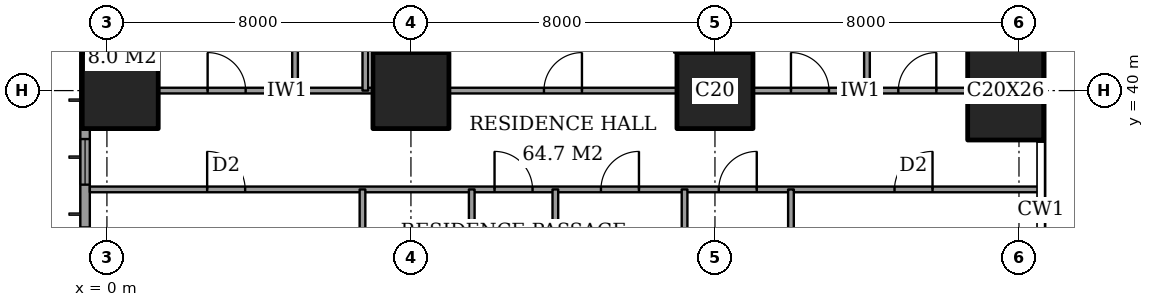
"""IFC4 building model, lengths in metres.
Left out: names, types, materials, properties, quantities, classifications, styles, units other than length and angle.
Written with IfcOpenShell. Run it as: python <this file> out.ifc"""

import sys

from ifc_helpers import new_model, si_unit, direction, frame, frame_2d, origin, origin_2d, place, context, subcontext, project, spatial, rectangle, extrude, element, fill, save


model = new_model("IFC4")
c1 = context("Model", 3, precision=1e-05, world=origin(), true_north=direction((0.0, 1.0)))
c2 = subcontext(c1, "Body", "Model", "MODEL_VIEW")
j1 = project(units=[si_unit("LENGTHUNIT", "METRE"), si_unit("PLANEANGLEUNIT", "RADIAN")], contexts=[c1])
p1 = place(None, origin())
s1 = spatial("IfcSite", under=j1, at=p1, CompositionType="ELEMENT")
p2 = place(p1, origin())
s2 = spatial("IfcBuilding", under=s1, at=p2, CompositionType="ELEMENT")
p3 = place(p2, frame((0.0, 0.0, 72.8)))
s3 = spatial("IfcBuildingStorey", under=s2, at=p3, CompositionType="ELEMENT", Elevation=72.8)
for number, where, z_axis, x_axis in (
    (1, (0.35, 40.0, 0.0), (0.0, 0.0, 1.0), (1.0, 0.0, 0.0)),
    (2, (8.0, 40.0, 0.0), (0.0, 0.0, 1.0), (1.0, 0.0, 0.0)),
    (3, (16.0, 40.0, 0.0), (0.0, 0.0, 1.0), (1.0, 0.0, 0.0)),
):
    element("IfcColumn", number, at=place(p3, frame(where, z_axis=z_axis, x_axis=x_axis)), inside=s3, PredefinedType="COLUMN", context=c2, shape_type="SweptSolid", body=[
        extrude(rectangle(XDim=2.0, YDim=2.0, at=origin_2d()), origin(), (0.0, 0.0, 1.0), 3.6),
    ])
p4 = place(p3, frame((23.65, 40.0, 0.0), z_axis=(0.0, 0.0, 1.0), x_axis=(1.0, 0.0, 0.0)))
e4 = element("IfcColumn", 4, at=p4, inside=s3, PredefinedType="COLUMN", context=c2, shape_type="SweptSolid", body=[
    extrude(rectangle(XDim=2.0, YDim=2.6, at=origin_2d()), origin(), (0.0, 0.0, 1.0), 3.6),
])
p5 = place(p3, frame((-0.575, 44.825, 0.0), z_axis=(0.0, 0.0, 1.0), x_axis=(0.0, -1.0, 0.0)))
e5 = element("IfcWall", 5, at=p5, inside=s3, PredefinedType="SOLIDWALL", context=c2, shape_type="SweptSolid", body=[
    extrude(rectangle(XDim=41.65, YDim=0.25, at=frame_2d((20.825, 0.0))), origin(), (0.0, 0.0, 1.0), 3.6),
])
p6 = place(p5, frame((0.775, 0.0, 0.6)))
e6 = element("IfcOpeningElement", 6, at=p6, cuts=e5, PredefinedType="OPENING", context=c2, shape_type="SweptSolid", body=[
    extrude(rectangle(XDim=2.4, YDim=2.0, at=frame_2d((1.2, 1.0))), frame((0.0, 0.135, 0.0), z_axis=(0.0, -1.0, 0.0), x_axis=(1.0, 0.0, 0.0)), (0.0, 0.0, 1.0), 0.27),
])
p7 = place(p5, frame((6.1, 0.0, 0.6)))
e7 = element("IfcOpeningElement", 7, at=p7, cuts=e5, PredefinedType="OPENING", context=c2, shape_type="SweptSolid", body=[
    extrude(rectangle(XDim=1.2, YDim=2.0, at=frame_2d((0.6, 1.0))), frame((0.0, 0.135, 0.0), z_axis=(0.0, -1.0, 0.0), x_axis=(1.0, 0.0, 0.0)), (0.0, 0.0, 1.0), 0.27),
])
p8 = place(p5, frame((8.425, 0.0, 0.6)))
e8 = element("IfcOpeningElement", 8, at=p8, cuts=e5, PredefinedType="OPENING", context=c2, shape_type="SweptSolid", body=[
    extrude(rectangle(XDim=2.4, YDim=2.0, at=frame_2d((1.2, 1.0))), frame((0.0, 0.135, 0.0), z_axis=(0.0, -1.0, 0.0), x_axis=(1.0, 0.0, 0.0)), (0.0, 0.0, 1.0), 0.27),
])
p9 = place(p5, frame((15.625, 0.0, 0.6)))
e9 = element("IfcOpeningElement", 9, at=p9, cuts=e5, PredefinedType="OPENING", context=c2, shape_type="SweptSolid", body=[
    extrude(rectangle(XDim=2.4, YDim=2.0, at=frame_2d((1.2, 1.0))), frame((0.0, 0.135, 0.0), z_axis=(0.0, -1.0, 0.0), x_axis=(1.0, 0.0, 0.0)), (0.0, 0.0, 1.0), 0.27),
])
p10 = place(p5, frame((23.625, 0.0, 0.6)))
e10 = element("IfcOpeningElement", 10, at=p10, cuts=e5, PredefinedType="OPENING", context=c2, shape_type="SweptSolid", body=[
    extrude(rectangle(XDim=2.4, YDim=2.0, at=frame_2d((1.2, 1.0))), frame((0.0, 0.135, 0.0), z_axis=(0.0, -1.0, 0.0), x_axis=(1.0, 0.0, 0.0)), (0.0, 0.0, 1.0), 0.27),
])
p11 = place(p5, frame((30.625, 0.0, 0.6)))
e11 = element("IfcOpeningElement", 11, at=p11, cuts=e5, PredefinedType="OPENING", context=c2, shape_type="SweptSolid", body=[
    extrude(rectangle(XDim=2.4, YDim=2.0, at=frame_2d((1.2, 1.0))), frame((0.0, 0.135, 0.0), z_axis=(0.0, -1.0, 0.0), x_axis=(1.0, 0.0, 0.0)), (0.0, 0.0, 1.0), 0.27),
])
p12 = place(p5, frame((34.225, 0.0, 0.6)))
e12 = element("IfcOpeningElement", 12, at=p12, cuts=e5, PredefinedType="OPENING", context=c2, shape_type="SweptSolid", body=[
    extrude(rectangle(XDim=1.2, YDim=2.0, at=frame_2d((0.6, 1.0))), frame((0.0, 0.135, 0.0), z_axis=(0.0, -1.0, 0.0), x_axis=(1.0, 0.0, 0.0)), (0.0, 0.0, 1.0), 0.27),
])
p13 = place(p5, frame((38.475, 0.0, 0.6)))
e13 = element("IfcOpeningElement", 13, at=p13, cuts=e5, PredefinedType="OPENING", context=c2, shape_type="SweptSolid", body=[
    extrude(rectangle(XDim=2.4, YDim=2.0, at=frame_2d((1.2, 1.0))), frame((0.0, 0.135, 0.0), z_axis=(0.0, -1.0, 0.0), x_axis=(1.0, 0.0, 0.0)), (0.0, 0.0, 1.0), 0.27),
])
p14 = place(p3, frame((-0.45, 37.4, 0.0), z_axis=(0.0, 0.0, 1.0), x_axis=(1.0, 0.0, 0.0)))
e14 = element("IfcWall", 14, at=p14, inside=s3, PredefinedType="PARTITIONING", context=c2, shape_type="SweptSolid", body=[
    extrude(rectangle(XDim=25.011, YDim=0.15, at=frame_2d((12.505, 0.0))), origin(), (0.0, 0.0, 1.0), 3.35),
])
p15 = place(p14, frame((10.65, 0.0, 0.0)))
e15 = element("IfcOpeningElement", 15, at=p15, cuts=e14, PredefinedType="OPENING", context=c2, shape_type="SweptSolid", body=[
    extrude(rectangle(XDim=1.0, YDim=2.1, at=frame_2d((0.5, 1.05))), frame((0.0, 0.085, 0.0), z_axis=(0.0, -1.0, 0.0), x_axis=(1.0, 0.0, 0.0)), (0.0, 0.0, 1.0), 0.17),
])
p16 = place(p14, frame((3.087, 0.0, 0.0)))
e16 = element("IfcOpeningElement", 16, at=p16, cuts=e14, PredefinedType="OPENING", context=c2, shape_type="SweptSolid", body=[
    extrude(rectangle(XDim=1.0, YDim=2.1, at=frame_2d((0.5, 1.05))), frame((0.0, 0.085, 0.0), z_axis=(0.0, -1.0, 0.0), x_axis=(1.0, 0.0, 0.0)), (0.0, 0.0, 1.0), 0.17),
])
p17 = place(p14, frame((13.45, 0.0, 0.0)))
e17 = element("IfcOpeningElement", 17, at=p17, cuts=e14, PredefinedType="OPENING", context=c2, shape_type="SweptSolid", body=[
    extrude(rectangle(XDim=1.0, YDim=2.1, at=frame_2d((0.5, 1.05))), frame((0.0, 0.085, 0.0), z_axis=(0.0, -1.0, 0.0), x_axis=(1.0, 0.0, 0.0)), (0.0, 0.0, 1.0), 0.17),
])
p18 = place(p14, frame((16.55, 0.0, 0.0)))
e18 = element("IfcOpeningElement", 18, at=p18, cuts=e14, PredefinedType="OPENING", context=c2, shape_type="SweptSolid", body=[
    extrude(rectangle(XDim=1.0, YDim=2.1, at=frame_2d((0.5, 1.05))), frame((0.0, 0.085, 0.0), z_axis=(0.0, -1.0, 0.0), x_axis=(1.0, 0.0, 0.0)), (0.0, 0.0, 1.0), 0.17),
])
p19 = place(p14, frame((21.175, 0.0, 0.0)))
e19 = element("IfcOpeningElement", 19, at=p19, cuts=e14, PredefinedType="OPENING", context=c2, shape_type="SweptSolid", body=[
    extrude(rectangle(XDim=1.0, YDim=2.1, at=frame_2d((0.5, 1.05))), frame((0.0, 0.085, 0.0), z_axis=(0.0, -1.0, 0.0), x_axis=(1.0, 0.0, 0.0)), (0.0, 0.0, 1.0), 0.17),
])
p20 = place(p3, frame((1.35, 40.0, 0.0), z_axis=(0.0, 0.0, 1.0), x_axis=(1.0, 0.0, 0.0)))
e20 = element("IfcWall", 20, at=p20, inside=s3, PredefinedType="PARTITIONING", context=c2, shape_type="SweptSolid", body=[
    extrude(rectangle(XDim=5.65, YDim=0.15, at=frame_2d((2.825, 0.0))), origin(), (0.0, 0.0, 1.0), 3.35),
])
p21 = place(p20, frame((1.3, 0.0, 0.0)))
e21 = element("IfcOpeningElement", 21, at=p21, cuts=e20, PredefinedType="OPENING", context=c2, shape_type="SweptSolid", body=[
    extrude(rectangle(XDim=1.0, YDim=2.1, at=frame_2d((0.5, 1.05))), frame((0.0, 0.085, 0.0), z_axis=(0.0, -1.0, 0.0), x_axis=(1.0, 0.0, 0.0)), (0.0, 0.0, 1.0), 0.17),
])
p22 = place(p3, frame((9.0, 40.0, 0.0), z_axis=(0.0, 0.0, 1.0), x_axis=(1.0, 0.0, 0.0)))
e22 = element("IfcWall", 22, at=p22, inside=s3, PredefinedType="PARTITIONING", context=c2, shape_type="SweptSolid", body=[
    extrude(rectangle(XDim=6.0, YDim=0.15, at=frame_2d((3.0, 0.0))), origin(), (0.0, 0.0, 1.0), 3.35),
])
p23 = place(p22, frame((2.5, 0.0, 0.0)))
e23 = element("IfcOpeningElement", 23, at=p23, cuts=e22, PredefinedType="OPENING", context=c2, shape_type="SweptSolid", body=[
    extrude(rectangle(XDim=1.0, YDim=2.1, at=frame_2d((0.5, 1.05))), frame((0.0, 0.085, 0.0), z_axis=(0.0, -1.0, 0.0), x_axis=(1.0, 0.0, 0.0)), (0.0, 0.0, 1.0), 0.17),
])
p24 = place(p3, frame((17.0, 40.0, 0.0), z_axis=(0.0, 0.0, 1.0), x_axis=(1.0, 0.0, 0.0)))
e24 = element("IfcWall", 24, at=p24, inside=s3, PredefinedType="PARTITIONING", context=c2, shape_type="SweptSolid", body=[
    extrude(rectangle(XDim=5.65, YDim=0.15, at=frame_2d((2.825, 0.0))), origin(), (0.0, 0.0, 1.0), 3.35),
])
p25 = place(p24, frame((1.0, 0.0, 0.0)))
e25 = element("IfcOpeningElement", 25, at=p25, cuts=e24, PredefinedType="OPENING", context=c2, shape_type="SweptSolid", body=[
    extrude(rectangle(XDim=1.0, YDim=2.1, at=frame_2d((0.5, 1.05))), frame((0.0, 0.085, 0.0), z_axis=(0.0, -1.0, 0.0), x_axis=(1.0, 0.0, 0.0)), (0.0, 0.0, 1.0), 0.17),
])
p26 = place(p24, frame((3.825, 0.0, 0.0)))
e26 = element("IfcOpeningElement", 26, at=p26, cuts=e24, PredefinedType="OPENING", context=c2, shape_type="SweptSolid", body=[
    extrude(rectangle(XDim=1.0, YDim=2.1, at=frame_2d((0.5, 1.05))), frame((0.0, 0.085, 0.0), z_axis=(0.0, -1.0, 0.0), x_axis=(1.0, 0.0, 0.0)), (0.0, 0.0, 1.0), 0.17),
])
p27 = place(p3, frame((4.95, 40.0, 0.0), z_axis=(0.0, 0.0, 1.0), x_axis=(0.0, 1.0, 0.0)))
e27 = element("IfcWall", 27, at=p27, inside=s3, PredefinedType="PARTITIONING", context=c2, shape_type="SweptSolid", body=[
    extrude(rectangle(XDim=8.45, YDim=0.15, at=frame_2d((4.225, 0.0))), origin(), (0.0, 0.0, 1.0), 3.35),
])
p28 = place(p27, frame((3.775, 0.0, 0.0)))
e28 = element("IfcOpeningElement", 28, at=p28, cuts=e27, PredefinedType="OPENING", context=c2, shape_type="SweptSolid", body=[
    extrude(rectangle(XDim=0.9, YDim=2.1, at=frame_2d((0.45, 1.05))), frame((0.0, 0.085, 0.0), z_axis=(0.0, -1.0, 0.0), x_axis=(1.0, 0.0, 0.0)), (0.0, 0.0, 1.0), 0.17),
])
p29 = place(p3, frame((6.725, 33.2, 0.0), z_axis=(0.0, 0.0, 1.0), x_axis=(0.0, 1.0, 0.0)))
e29 = element("IfcWall", 29, at=p29, inside=s3, PredefinedType="PARTITIONING", context=c2, shape_type="SweptSolid", body=[
    extrude(rectangle(XDim=4.2, YDim=0.15, at=frame_2d((2.1, 0.0))), origin(), (0.0, 0.0, 1.0), 3.35),
])
p30 = place(p29, frame((2.1, 0.0, 0.0)))
e30 = element("IfcOpeningElement", 30, at=p30, cuts=e29, PredefinedType="OPENING", context=c2, shape_type="SweptSolid", body=[
    extrude(rectangle(XDim=0.9, YDim=2.1, at=frame_2d((0.45, 1.05))), frame((0.0, 0.085, 0.0), z_axis=(0.0, -1.0, 0.0), x_axis=(1.0, 0.0, 0.0)), (0.0, 0.0, 1.0), 0.17),
])
p31 = place(p3, frame((6.8, 40.0, 0.0), z_axis=(0.0, 0.0, 1.0), x_axis=(0.0, 1.0, 0.0)))
e31 = element("IfcWall", 31, at=p31, inside=s3, PredefinedType="PARTITIONING", context=c2, shape_type="SweptSolid", body=[
    extrude(rectangle(XDim=8.45, YDim=0.15, at=frame_2d((4.225, 0.0))), origin(), (0.0, 0.0, 1.0), 3.35),
])
p32 = place(p3, frame((9.6, 28.0, 0.0), z_axis=(0.0, 0.0, 1.0), x_axis=(0.0, 1.0, 0.0)))
e32 = element("IfcWall", 32, at=p32, inside=s3, PredefinedType="PARTITIONING", context=c2, shape_type="SweptSolid", body=[
    extrude(rectangle(XDim=9.4, YDim=0.15, at=frame_2d((4.7, 0.0))), origin(), (0.0, 0.0, 1.0), 3.35),
])
p33 = place(p32, frame((0.5, 0.0, 0.0)))
e33 = element("IfcOpeningElement", 33, at=p33, cuts=e32, PredefinedType="OPENING", context=c2, shape_type="SweptSolid", body=[
    extrude(rectangle(XDim=1.0, YDim=2.1, at=frame_2d((0.5, 1.05))), frame((0.0, 0.085, 0.0), z_axis=(0.0, -1.0, 0.0), x_axis=(1.0, 0.0, 0.0)), (0.0, 0.0, 1.0), 0.17),
])
p34 = place(p3, frame((11.8, 30.0, 0.0), z_axis=(0.0, 0.0, 1.0), x_axis=(0.0, 1.0, 0.0)))
e34 = element("IfcWall", 34, at=p34, inside=s3, PredefinedType="PARTITIONING", context=c2, shape_type="SweptSolid", body=[
    extrude(rectangle(XDim=7.4, YDim=0.15, at=frame_2d((3.7, 0.0))), origin(), (0.0, 0.0, 1.0), 3.35),
])
p35 = place(p3, frame((15.2, 33.2, 0.0), z_axis=(0.0, 0.0, 1.0), x_axis=(0.0, 1.0, 0.0)))
e35 = element("IfcWall", 35, at=p35, inside=s3, PredefinedType="PARTITIONING", context=c2, shape_type="SweptSolid", body=[
    extrude(rectangle(XDim=4.2, YDim=0.15, at=frame_2d((2.1, 0.0))), origin(), (0.0, 0.0, 1.0), 3.35),
])
p36 = place(p3, frame((18.0, 31.4, 0.0), z_axis=(0.0, 0.0, 1.0), x_axis=(0.0, 1.0, 0.0)))
e36 = element("IfcWall", 36, at=p36, inside=s3, PredefinedType="PARTITIONING", context=c2, shape_type="SweptSolid", body=[
    extrude(rectangle(XDim=6.0, YDim=0.15, at=frame_2d((3.0, 0.0))), origin(), (0.0, 0.0, 1.0), 3.35),
])
p37 = place(p3, frame((20.0, 40.0, 0.0), z_axis=(0.0, 0.0, 1.0), x_axis=(0.0, 1.0, 0.0)))
e37 = element("IfcWall", 37, at=p37, inside=s3, PredefinedType="PARTITIONING", context=c2, shape_type="SweptSolid", body=[
    extrude(rectangle(XDim=8.45, YDim=0.15, at=frame_2d((4.225, 0.0))), origin(), (0.0, 0.0, 1.0), 3.35),
])
p38 = place(p7, origin())
e38 = element("IfcWindow", 38, at=p38, inside=s3, PartitioningType="SINGLE_PANEL", PredefinedType="WINDOW", context=c2, shape_type="SweptSolid", body=[
    extrude(rectangle(XDim=1.2, YDim=2.0, at=frame_2d((0.6, 1.0))), frame((0.0, 0.03, 0.0), z_axis=(0.0, -1.0, 0.0), x_axis=(1.0, 0.0, 0.0)), (0.0, 0.0, 1.0), 0.06),
])
fill(e7, e38)
p39 = place(p21, origin())
e39 = element("IfcDoor", 39, at=p39, inside=s3, OperationType="SINGLE_SWING_RIGHT", PredefinedType="DOOR", context=c2, shape_type="SweptSolid", body=[
    extrude(rectangle(XDim=1.0, YDim=2.1, at=frame_2d((0.5, 1.05))), frame((0.0, 0.025, 0.0), z_axis=(0.0, -1.0, 0.0), x_axis=(1.0, 0.0, 0.0)), (0.0, 0.0, 1.0), 0.05),
])
fill(e21, e39)
p40 = place(p23, origin())
e40 = element("IfcDoor", 40, at=p40, inside=s3, OperationType="SINGLE_SWING_LEFT", PredefinedType="DOOR", context=c2, shape_type="SweptSolid", body=[
    extrude(rectangle(XDim=1.0, YDim=2.1, at=frame_2d((0.5, 1.05))), frame((0.0, 0.025, 0.0), z_axis=(0.0, -1.0, 0.0), x_axis=(1.0, 0.0, 0.0)), (0.0, 0.0, 1.0), 0.05),
])
fill(e23, e40)
p41 = place(p25, origin())
e41 = element("IfcDoor", 41, at=p41, inside=s3, OperationType="SINGLE_SWING_RIGHT", PredefinedType="DOOR", context=c2, shape_type="SweptSolid", body=[
    extrude(rectangle(XDim=1.0, YDim=2.1, at=frame_2d((0.5, 1.05))), frame((0.0, 0.025, 0.0), z_axis=(0.0, -1.0, 0.0), x_axis=(1.0, 0.0, 0.0)), (0.0, 0.0, 1.0), 0.05),
])
fill(e25, e41)
p42 = place(p26, origin())
e42 = element("IfcDoor", 42, at=p42, inside=s3, OperationType="SINGLE_SWING_LEFT", PredefinedType="DOOR", context=c2, shape_type="SweptSolid", body=[
    extrude(rectangle(XDim=1.0, YDim=2.1, at=frame_2d((0.5, 1.05))), frame((0.0, 0.025, 0.0), z_axis=(0.0, -1.0, 0.0), x_axis=(1.0, 0.0, 0.0)), (0.0, 0.0, 1.0), 0.05),
])
fill(e26, e42)
p43 = place(p15, origin())
e43 = element("IfcDoor", 43, at=p43, inside=s3, OperationType="SINGLE_SWING_RIGHT", PredefinedType="DOOR", context=c2, shape_type="SweptSolid", body=[
    extrude(rectangle(XDim=1.0, YDim=2.1, at=frame_2d((0.5, 1.05))), frame((0.0, 0.025, 0.0), z_axis=(0.0, -1.0, 0.0), x_axis=(1.0, 0.0, 0.0)), (0.0, 0.0, 1.0), 0.05),
])
fill(e15, e43)
p44 = place(p16, origin())
e44 = element("IfcDoor", 44, at=p44, inside=s3, OperationType="SINGLE_SWING_RIGHT", PredefinedType="DOOR", context=c2, shape_type="SweptSolid", body=[
    extrude(rectangle(XDim=1.0, YDim=2.1, at=frame_2d((0.5, 1.05))), frame((0.0, 0.025, 0.0), z_axis=(0.0, -1.0, 0.0), x_axis=(1.0, 0.0, 0.0)), (0.0, 0.0, 1.0), 0.05),
])
fill(e16, e44)
p45 = place(p17, origin())
e45 = element("IfcDoor", 45, at=p45, inside=s3, OperationType="SINGLE_SWING_LEFT", PredefinedType="DOOR", context=c2, shape_type="SweptSolid", body=[
    extrude(rectangle(XDim=1.0, YDim=2.1, at=frame_2d((0.5, 1.05))), frame((0.0, 0.025, 0.0), z_axis=(0.0, -1.0, 0.0), x_axis=(1.0, 0.0, 0.0)), (0.0, 0.0, 1.0), 0.05),
])
fill(e17, e45)
p46 = place(p18, origin())
e46 = element("IfcDoor", 46, at=p46, inside=s3, OperationType="SINGLE_SWING_LEFT", PredefinedType="DOOR", context=c2, shape_type="SweptSolid", body=[
    extrude(rectangle(XDim=1.0, YDim=2.1, at=frame_2d((0.5, 1.05))), frame((0.0, 0.025, 0.0), z_axis=(0.0, -1.0, 0.0), x_axis=(1.0, 0.0, 0.0)), (0.0, 0.0, 1.0), 0.05),
])
fill(e18, e46)
p47 = place(p19, origin())
e47 = element("IfcDoor", 47, at=p47, inside=s3, OperationType="SINGLE_SWING_LEFT", PredefinedType="DOOR", context=c2, shape_type="SweptSolid", body=[
    extrude(rectangle(XDim=1.0, YDim=2.1, at=frame_2d((0.5, 1.05))), frame((0.0, 0.025, 0.0), z_axis=(0.0, -1.0, 0.0), x_axis=(1.0, 0.0, 0.0)), (0.0, 0.0, 1.0), 0.05),
])
fill(e19, e47)
save(model, sys.argv[1])
